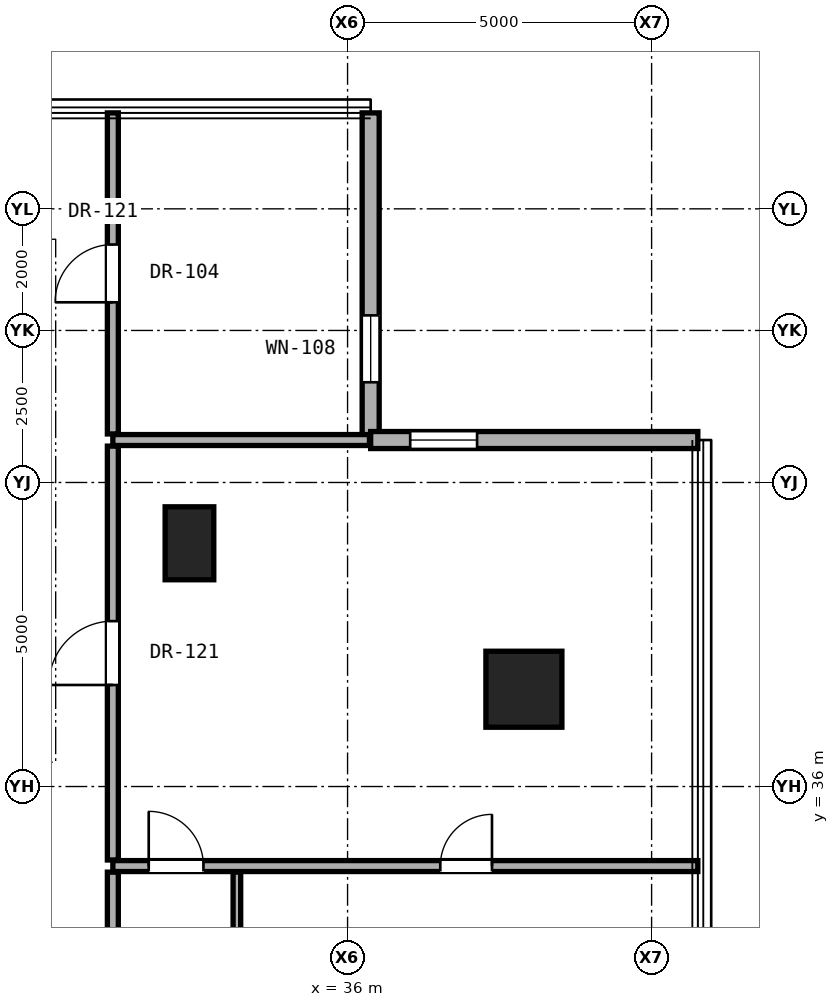
"""IFC4 building model, lengths in metres.
Left out: names, types, materials, properties, quantities, classifications, styles, units other than length and angle.
Written with IfcOpenShell. Run it as: python <this file> out.ifc"""

import sys

from ifc_helpers import new_model, si_unit, direction, frame, frame_2d, origin, origin_2d, place, context, subcontext, project, spatial, rectangle, hollow_rectangle, extrude, element, fill, save


model = new_model("IFC4")
c1 = context("Model", 3, precision=1e-05, world=origin(), true_north=direction((0.0, 1.0)))
c2 = subcontext(c1, "Body", "Model", "MODEL_VIEW")
j1 = project(units=[si_unit("LENGTHUNIT", "METRE"), si_unit("PLANEANGLEUNIT", "RADIAN")], contexts=[c1])
p1 = place(None, origin())
s1 = spatial("IfcSite", under=j1, at=p1, CompositionType="ELEMENT")
p2 = place(p1, origin())
s2 = spatial("IfcBuilding", under=s1, at=p2, CompositionType="ELEMENT")
p3 = place(p2, frame((0.0, 0.0, 25.7)))
s3 = spatial("IfcBuildingStorey", under=s2, at=p3, CompositionType="ELEMENT", Elevation=25.7)
p4 = place(p3, frame((38.9, 37.6, 0.0), z_axis=(0.0, 0.0, 1.0), x_axis=(1.0, 0.0, 0.0)))
e1 = element("IfcColumn", 1, at=p4, inside=s3, PredefinedType="COLUMN", context=c2, shape_type="SweptSolid", body=[
    extrude(hollow_rectangle(XDim=1.25, YDim=1.25, WallThickness=0.07, at=origin_2d()), origin(), (0.0, 0.0, 1.0), 3.3),
])
p5 = place(p3, frame((33.4, 40.0, 0.0), z_axis=(0.0, 0.0, 1.0), x_axis=(1.0, 0.0, 0.0)))
e2 = element("IfcColumn", 2, at=p5, inside=s3, PredefinedType="PILASTER", context=c2, shape_type="SweptSolid", body=[
    extrude(rectangle(XDim=0.8, YDim=1.2, at=origin_2d()), origin(), (0.0, 0.0, 1.0), 3.3),
])
p6 = place(p3, frame((36.38, 41.698, 0.0), z_axis=(0.0, 0.0, 1.0), x_axis=(0.0, 1.0, 0.0)))
e3 = element("IfcWall", 3, at=p6, inside=s3, PredefinedType="SOLIDWALL", context=c2, shape_type="SweptSolid", body=[
    extrude(rectangle(XDim=5.38, YDim=0.28, at=frame_2d((2.69, 0.0))), origin(), (0.0, 0.0, 1.0), 3.04),
])
p7 = place(p6, frame((0.95, 0.0, 0.85)))
e4 = element("IfcOpeningElement", 4, at=p7, cuts=e3, PredefinedType="OPENING", context=c2, shape_type="SweptSolid", body=[
    extrude(rectangle(XDim=1.1, YDim=2.0, at=frame_2d((0.55, 1.0))), frame((0.0, 0.15, 0.0), z_axis=(0.0, -1.0, 0.0), x_axis=(1.0, 0.0, 0.0)), (0.0, 0.0, 1.0), 0.3),
])
p8 = place(p3, frame((41.76, 41.698, 0.0), z_axis=(0.0, 0.0, 1.0), x_axis=(-1.0, 0.0, 0.0)))
e5 = element("IfcWall", 5, at=p8, inside=s3, PredefinedType="SOLIDWALL", context=c2, shape_type="SweptSolid", body=[
    extrude(rectangle(XDim=5.38, YDim=0.28, at=frame_2d((2.69, 0.0))), origin(), (0.0, 0.0, 1.0), 3.04),
])
p9 = place(p8, frame((3.63, 0.0, 0.85)))
e6 = element("IfcOpeningElement", 6, at=p9, cuts=e5, PredefinedType="OPENING", context=c2, shape_type="SweptSolid", body=[
    extrude(rectangle(XDim=1.1, YDim=2.0, at=frame_2d((0.55, 1.0))), frame((0.0, 0.15, 0.0), z_axis=(0.0, -1.0, 0.0), x_axis=(1.0, 0.0, 0.0)), (0.0, 0.0, 1.0), 0.3),
])
p10 = place(p3, frame((32.14, 34.692, 0.0), z_axis=(0.0, 0.0, 1.0), x_axis=(1.0, 0.0, 0.0)))
e7 = element("IfcWall", 7, at=p10, inside=s3, PredefinedType="PARTITIONING", context=c2, shape_type="SweptSolid", body=[
    extrude(rectangle(XDim=9.62, YDim=0.18, at=frame_2d((4.81, 0.0))), origin(), (0.0, 0.0, 1.0), 2.125),
])
p11 = place(p10, frame((5.385, 0.0, 0.0)))
e8 = element("IfcOpeningElement", 8, at=p11, cuts=e7, PredefinedType="OPENING", context=c2, shape_type="SweptSolid", body=[
    extrude(rectangle(XDim=0.85, YDim=2.01, at=frame_2d((0.425, 1.005))), frame((0.0, 0.1, 0.0), z_axis=(0.0, -1.0, 0.0), x_axis=(1.0, 0.0, 0.0)), (0.0, 0.0, 1.0), 0.2),
])
p12 = place(p10, frame((0.59, 0.0, 0.0)))
e9 = element("IfcOpeningElement", 9, at=p12, cuts=e7, PredefinedType="OPENING", context=c2, shape_type="SweptSolid", body=[
    extrude(rectangle(XDim=0.9, YDim=2.1, at=frame_2d((0.45, 1.05))), frame((0.0, 0.1, 0.0), z_axis=(0.0, -1.0, 0.0), x_axis=(1.0, 0.0, 0.0)), (0.0, 0.0, 1.0), 0.2),
])
p13 = place(p3, frame((32.14, 41.698, 0.0), z_axis=(0.0, 0.0, 1.0), x_axis=(1.0, 0.0, 0.0)))
e10 = element("IfcWall", 10, at=p13, inside=s3, PredefinedType="PARTITIONING", context=c2, shape_type="SweptSolid", body=[
    extrude(rectangle(XDim=4.22, YDim=0.18, at=frame_2d((2.11, 0.0))), origin(), (0.0, 0.0, 1.0), 3.06),
])
p14 = place(p3, frame((32.14, 32.492, 0.0), z_axis=(0.0, 0.0, 1.0), x_axis=(0.0, 1.0, 0.0)))
e11 = element("IfcWall", 11, at=p14, inside=s3, PredefinedType="PARTITIONING", context=c2, shape_type="SweptSolid", body=[
    extrude(rectangle(XDim=2.1, YDim=0.18, at=frame_2d((1.05, 0.0))), origin(), (0.0, 0.0, 1.0), 3.06),
])
p15 = place(p3, frame((32.14, 34.792, 0.0), z_axis=(0.0, 0.0, 1.0), x_axis=(0.0, 1.0, 0.0)))
e12 = element("IfcWall", 12, at=p15, inside=s3, PredefinedType="PARTITIONING", context=c2, shape_type="SweptSolid", body=[
    extrude(rectangle(XDim=6.806, YDim=0.18, at=frame_2d((3.403, 0.0))), origin(), (0.0, 0.0, 1.0), 2.436),
])
p16 = place(p15, frame((2.878, 0.0, 0.0)))
e13 = element("IfcOpeningElement", 13, at=p16, cuts=e12, PredefinedType="OPENING", context=c2, shape_type="SweptSolid", body=[
    extrude(rectangle(XDim=1.05, YDim=2.2, at=frame_2d((0.525, 1.1))), frame((0.0, 0.1, 0.0), z_axis=(0.0, -1.0, 0.0), x_axis=(1.0, 0.0, 0.0)), (0.0, 0.0, 1.0), 0.2),
])
p17 = place(p3, frame((32.14, 41.798, 0.0), z_axis=(0.0, 0.0, 1.0), x_axis=(0.0, 1.0, 0.0)))
e14 = element("IfcWall", 14, at=p17, inside=s3, PredefinedType="PARTITIONING", context=c2, shape_type="SweptSolid", body=[
    extrude(rectangle(XDim=5.28, YDim=0.18, at=frame_2d((2.64, 0.0))), origin(), (0.0, 0.0, 1.0), 3.06),
])
p18 = place(p17, frame((2.165, 0.0, 0.0)))
e15 = element("IfcOpeningElement", 15, at=p18, cuts=e14, PredefinedType="OPENING", context=c2, shape_type="SweptSolid", body=[
    extrude(rectangle(XDim=0.95, YDim=2.15, at=frame_2d((0.475, 1.075))), frame((0.0, 0.1, 0.0), z_axis=(0.0, -1.0, 0.0), x_axis=(1.0, 0.0, 0.0)), (0.0, 0.0, 1.0), 0.2),
])
p19 = place(p3, frame((34.18, 32.492, 0.0), z_axis=(0.0, 0.0, 1.0), x_axis=(0.0, 1.0, 0.0)))
e16 = element("IfcWall", 16, at=p19, inside=s3, PredefinedType="PARTITIONING", context=c2, shape_type="SweptSolid", body=[
    extrude(rectangle(XDim=2.1, YDim=0.125, at=frame_2d((1.05, 0.0))), origin(), (0.0, 0.0, 1.0), 3.06),
])
p20 = place(p7, origin())
e17 = element("IfcWindow", 17, at=p20, inside=s3, PartitioningType="SINGLE_PANEL", PredefinedType="WINDOW", context=c2, shape_type="SweptSolid", body=[
    extrude(rectangle(XDim=1.1, YDim=2.0, at=frame_2d((0.55, 1.0))), frame((0.0, 0.03, 0.0), z_axis=(0.0, -1.0, 0.0), x_axis=(1.0, 0.0, 0.0)), (0.0, 0.0, 1.0), 0.06),
])
fill(e4, e17)
p21 = place(p9, origin())
e18 = element("IfcWindow", 18, at=p21, inside=s3, PartitioningType="SINGLE_PANEL", PredefinedType="WINDOW", context=c2, shape_type="SweptSolid", body=[
    extrude(rectangle(XDim=1.1, YDim=2.0, at=frame_2d((0.55, 1.0))), frame((0.0, 0.03, 0.0), z_axis=(0.0, -1.0, 0.0), x_axis=(1.0, 0.0, 0.0)), (0.0, 0.0, 1.0), 0.06),
])
fill(e6, e18)
p22 = place(p16, origin())
e19 = element("IfcDoor", 19, at=p22, inside=s3, OperationType="SINGLE_SWING_LEFT", PredefinedType="DOOR", context=c2, shape_type="SweptSolid", body=[
    extrude(rectangle(XDim=1.05, YDim=2.2, at=frame_2d((0.525, 1.1))), frame((0.0, 0.025, 0.0), z_axis=(0.0, -1.0, 0.0), x_axis=(1.0, 0.0, 0.0)), (0.0, 0.0, 1.0), 0.05),
])
fill(e13, e19)
p23 = place(p11, origin())
e20 = element("IfcDoor", 20, at=p23, inside=s3, OperationType="SINGLE_SWING_RIGHT", PredefinedType="DOOR", context=c2, shape_type="SweptSolid", body=[
    extrude(rectangle(XDim=0.85, YDim=2.01, at=frame_2d((0.425, 1.005))), frame((0.0, 0.025, 0.0), z_axis=(0.0, -1.0, 0.0), x_axis=(1.0, 0.0, 0.0)), (0.0, 0.0, 1.0), 0.05),
])
fill(e8, e20)
p24 = place(p12, origin())
e21 = element("IfcDoor", 21, at=p24, inside=s3, OperationType="SINGLE_SWING_LEFT", PredefinedType="DOOR", context=c2, shape_type="SweptSolid", body=[
    extrude(rectangle(XDim=0.9, YDim=2.1, at=frame_2d((0.45, 1.05))), frame((0.0, 0.025, 0.0), z_axis=(0.0, -1.0, 0.0), x_axis=(1.0, 0.0, 0.0)), (0.0, 0.0, 1.0), 0.05),
])
fill(e9, e21)
p25 = place(p18, origin())
e22 = element("IfcDoor", 22, at=p25, inside=s3, OperationType="SINGLE_SWING_LEFT", PredefinedType="DOOR", context=c2, shape_type="SweptSolid", body=[
    extrude(rectangle(XDim=0.95, YDim=2.15, at=frame_2d((0.475, 1.075))), frame((0.0, 0.025, 0.0), z_axis=(0.0, -1.0, 0.0), x_axis=(1.0, 0.0, 0.0)), (0.0, 0.0, 1.0), 0.05),
])
fill(e15, e22)
save(model, sys.argv[1])
